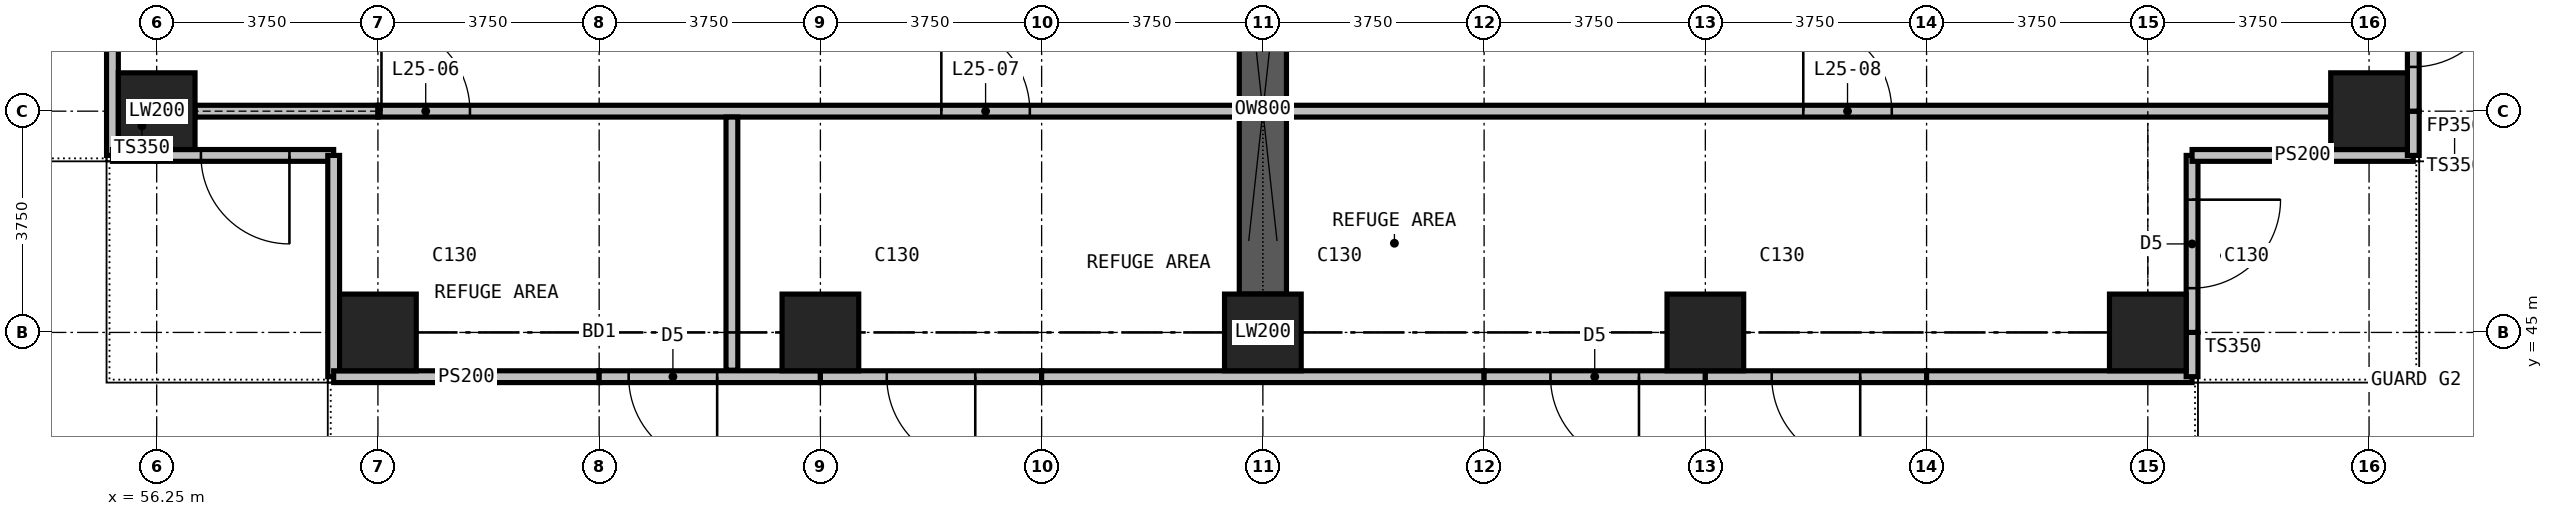
"""IFC4 building model, lengths in metres.
Left out: names, types, materials, properties, quantities, classifications, styles, units other than length and angle.
Written with IfcOpenShell. Run it as: python <this file> out.ifc"""

import sys

from ifc_helpers import new_model, si_unit, direction, frame, frame_2d, origin, origin_2d, place, context, subcontext, project, spatial, rectangle, extrude, element, fill, save


model = new_model("IFC4")
c1 = context("Model", 3, precision=1e-05, world=origin(), true_north=direction((0.0, 1.0)))
c2 = subcontext(c1, "Body", "Model", "MODEL_VIEW")
j1 = project(units=[si_unit("LENGTHUNIT", "METRE"), si_unit("PLANEANGLEUNIT", "RADIAN")], contexts=[c1])
p1 = place(None, origin())
s1 = spatial("IfcSite", under=j1, at=p1, CompositionType="ELEMENT")
p2 = place(p1, origin())
s2 = spatial("IfcBuilding", under=s1, at=p2, CompositionType="ELEMENT")
p3 = place(p2, frame((0.0, 0.0, 102.2)))
s3 = spatial("IfcBuildingStorey", under=s2, at=p3, CompositionType="ELEMENT", Elevation=102.2)
for number, where, z_axis, x_axis in (
    (1, (56.25, 48.75, 0.0), (0.0, 0.0, 1.0), (1.0, 0.0, 0.0)),
    (2, (60.0, 45.0, 0.0), (0.0, 0.0, 1.0), (1.0, 0.0, 0.0)),
    (3, (67.5, 45.0, 0.0), (0.0, 0.0, 1.0), (1.0, 0.0, 0.0)),
    (4, (75.0, 45.0, 0.0), (0.0, 0.0, 1.0), (1.0, 0.0, 0.0)),
    (5, (82.5, 45.0, 0.0), (0.0, 0.0, 1.0), (1.0, 0.0, 0.0)),
    (6, (90.0, 45.0, 0.0), (0.0, 0.0, 1.0), (1.0, 0.0, 0.0)),
    (7, (93.75, 48.75, 0.0), (0.0, 0.0, 1.0), (1.0, 0.0, 0.0)),
):
    element("IfcColumn", number, at=place(p3, frame(where, z_axis=z_axis, x_axis=x_axis)), inside=s3, PredefinedType="COLUMN", context=c2, shape_type="SweptSolid", body=[
        extrude(rectangle(XDim=1.3, YDim=1.3, at=origin_2d()), origin(), (0.0, 0.0, 1.0), 5.0),
    ])
p4 = place(p3, frame((75.0, 45.65, 0.0), z_axis=(0.0, 0.0, 1.0), x_axis=(0.0, 1.0, 0.0)))
e8 = element("IfcWall", 8, at=p4, inside=s3, PredefinedType="SHEAR", context=c2, shape_type="SweptSolid", body=[
    extrude(rectangle(XDim=6.275, YDim=0.8, at=frame_2d((3.138, 0.0))), origin(), (0.0, 0.0, 1.0), 4.7),
])
p5 = place(p3, frame((55.5, 48.0, 0.0), z_axis=(0.0, 0.0, 1.0), x_axis=(0.0, 1.0, 0.0)))
e9 = element("IfcWall", 9, at=p5, inside=s3, PredefinedType="SOLIDWALL", context=c2, shape_type="SweptSolid", body=[
    extrude(rectangle(XDim=3.75, YDim=0.2, at=frame_2d((1.875, 0.0))), origin(), (0.0, 0.0, 1.0), 4.7),
])
p6 = place(p3, frame((55.5, 48.0, 0.0), z_axis=(0.0, 0.0, 1.0), x_axis=(1.0, 0.0, 0.0)))
e10 = element("IfcWall", 10, at=p6, inside=s3, PredefinedType="SOLIDWALL", context=c2, shape_type="SweptSolid", body=[
    extrude(rectangle(XDim=0.75, YDim=0.2, at=frame_2d((0.375, 0.0))), origin(), (0.0, 0.0, 1.0), 4.7),
])
p7 = place(p3, frame((59.25, 48.0, 0.0), z_axis=(0.0, 0.0, 1.0), x_axis=(-1.0, 0.0, 0.0)))
e11 = element("IfcWall", 11, at=p7, inside=s3, PredefinedType="SOLIDWALL", context=c2, shape_type="SweptSolid", body=[
    extrude(rectangle(XDim=3.0, YDim=0.2, at=frame_2d((1.5, 0.0))), origin(), (0.0, 0.0, 1.0), 4.7),
])
p8 = place(p7, frame((0.75, 0.0, 0.0)))
e12 = element("IfcOpeningElement", 12, at=p8, cuts=e11, PredefinedType="OPENING", context=c2, shape_type="SweptSolid", body=[
    extrude(rectangle(XDim=1.5, YDim=2.4, at=frame_2d((0.75, 1.2))), frame((0.0, 0.11, 0.0), z_axis=(0.0, -1.0, 0.0), x_axis=(1.0, 0.0, 0.0)), (0.0, 0.0, 1.0), 0.22),
])
p9 = place(p3, frame((59.25, 44.25, 0.0), z_axis=(0.0, 0.0, 1.0), x_axis=(0.0, 1.0, 0.0)))
e13 = element("IfcWall", 13, at=p9, inside=s3, PredefinedType="SOLIDWALL", context=c2, shape_type="SweptSolid", body=[
    extrude(rectangle(XDim=3.75, YDim=0.2, at=frame_2d((1.875, 0.0))), origin(), (0.0, 0.0, 1.0), 4.7),
])
p10 = place(p3, frame((59.25, 44.25, 0.0), z_axis=(0.0, 0.0, 1.0), x_axis=(1.0, 0.0, 0.0)))
e14 = element("IfcWall", 14, at=p10, inside=s3, PredefinedType="SOLIDWALL", context=c2, shape_type="SweptSolid", body=[
    extrude(rectangle(XDim=4.5, YDim=0.2, at=frame_2d((2.25, 0.0))), origin(), (0.0, 0.0, 1.0), 4.7),
])
p11 = place(p3, frame((67.5, 44.25, 0.0), z_axis=(0.0, 0.0, 1.0), x_axis=(-1.0, 0.0, 0.0)))
e15 = element("IfcWall", 15, at=p11, inside=s3, PredefinedType="SOLIDWALL", context=c2, shape_type="SweptSolid", body=[
    extrude(rectangle(XDim=3.75, YDim=0.2, at=frame_2d((1.875, 0.0))), origin(), (0.0, 0.0, 1.0), 4.7),
])
p12 = place(p11, frame((1.75, 0.0, 0.0)))
e16 = element("IfcOpeningElement", 16, at=p12, cuts=e15, PredefinedType="OPENING", context=c2, shape_type="SweptSolid", body=[
    extrude(rectangle(XDim=1.5, YDim=2.4, at=frame_2d((0.75, 1.2))), frame((0.0, 0.11, 0.0), z_axis=(0.0, -1.0, 0.0), x_axis=(1.0, 0.0, 0.0)), (0.0, 0.0, 1.0), 0.22),
])
p13 = place(p3, frame((71.25, 44.25, 0.0), z_axis=(0.0, 0.0, 1.0), x_axis=(-1.0, 0.0, 0.0)))
e17 = element("IfcWall", 17, at=p13, inside=s3, PredefinedType="SOLIDWALL", context=c2, shape_type="SweptSolid", body=[
    extrude(rectangle(XDim=3.75, YDim=0.2, at=frame_2d((1.875, 0.0))), origin(), (0.0, 0.0, 1.0), 4.7),
])
p14 = place(p13, frame((1.125, 0.0, 0.0)))
e18 = element("IfcOpeningElement", 18, at=p14, cuts=e17, PredefinedType="OPENING", context=c2, shape_type="SweptSolid", body=[
    extrude(rectangle(XDim=1.5, YDim=2.4, at=frame_2d((0.75, 1.2))), frame((0.0, 0.11, 0.0), z_axis=(0.0, -1.0, 0.0), x_axis=(1.0, 0.0, 0.0)), (0.0, 0.0, 1.0), 0.22),
])
p15 = place(p3, frame((71.25, 44.25, 0.0), z_axis=(0.0, 0.0, 1.0), x_axis=(1.0, 0.0, 0.0)))
e19 = element("IfcWall", 19, at=p15, inside=s3, PredefinedType="SOLIDWALL", context=c2, shape_type="SweptSolid", body=[
    extrude(rectangle(XDim=7.5, YDim=0.2, at=frame_2d((3.75, 0.0))), origin(), (0.0, 0.0, 1.0), 4.7),
])
p16 = place(p3, frame((82.5, 44.25, 0.0), z_axis=(0.0, 0.0, 1.0), x_axis=(-1.0, 0.0, 0.0)))
e20 = element("IfcWall", 20, at=p16, inside=s3, PredefinedType="SOLIDWALL", context=c2, shape_type="SweptSolid", body=[
    extrude(rectangle(XDim=3.75, YDim=0.2, at=frame_2d((1.875, 0.0))), origin(), (0.0, 0.0, 1.0), 4.7),
])
p17 = place(p16, frame((1.125, 0.0, 0.0)))
e21 = element("IfcOpeningElement", 21, at=p17, cuts=e20, PredefinedType="OPENING", context=c2, shape_type="SweptSolid", body=[
    extrude(rectangle(XDim=1.5, YDim=2.4, at=frame_2d((0.75, 1.2))), frame((0.0, 0.11, 0.0), z_axis=(0.0, -1.0, 0.0), x_axis=(1.0, 0.0, 0.0)), (0.0, 0.0, 1.0), 0.22),
])
p18 = place(p3, frame((86.25, 44.25, 0.0), z_axis=(0.0, 0.0, 1.0), x_axis=(-1.0, 0.0, 0.0)))
e22 = element("IfcWall", 22, at=p18, inside=s3, PredefinedType="SOLIDWALL", context=c2, shape_type="SweptSolid", body=[
    extrude(rectangle(XDim=3.75, YDim=0.2, at=frame_2d((1.875, 0.0))), origin(), (0.0, 0.0, 1.0), 4.7),
])
p19 = place(p18, frame((1.125, 0.0, 0.0)))
e23 = element("IfcOpeningElement", 23, at=p19, cuts=e22, PredefinedType="OPENING", context=c2, shape_type="SweptSolid", body=[
    extrude(rectangle(XDim=1.5, YDim=2.4, at=frame_2d((0.75, 1.2))), frame((0.0, 0.11, 0.0), z_axis=(0.0, -1.0, 0.0), x_axis=(1.0, 0.0, 0.0)), (0.0, 0.0, 1.0), 0.22),
])
p20 = place(p3, frame((86.25, 44.25, 0.0), z_axis=(0.0, 0.0, 1.0), x_axis=(1.0, 0.0, 0.0)))
e24 = element("IfcWall", 24, at=p20, inside=s3, PredefinedType="SOLIDWALL", context=c2, shape_type="SweptSolid", body=[
    extrude(rectangle(XDim=4.5, YDim=0.2, at=frame_2d((2.25, 0.0))), origin(), (0.0, 0.0, 1.0), 4.7),
])
p21 = place(p3, frame((90.75, 44.25, 0.0), z_axis=(0.0, 0.0, 1.0), x_axis=(0.0, 1.0, 0.0)))
e25 = element("IfcWall", 25, at=p21, inside=s3, PredefinedType="SOLIDWALL", context=c2, shape_type="SweptSolid", body=[
    extrude(rectangle(XDim=0.75, YDim=0.2, at=frame_2d((0.375, 0.0))), origin(), (0.0, 0.0, 1.0), 4.7),
])
p22 = place(p3, frame((90.75, 48.0, 0.0), z_axis=(0.0, 0.0, 1.0), x_axis=(0.0, -1.0, 0.0)))
e26 = element("IfcWall", 26, at=p22, inside=s3, PredefinedType="SOLIDWALL", context=c2, shape_type="SweptSolid", body=[
    extrude(rectangle(XDim=3.0, YDim=0.2, at=frame_2d((1.5, 0.0))), origin(), (0.0, 0.0, 1.0), 4.7),
])
p23 = place(p22, frame((0.75, 0.0, 0.0)))
e27 = element("IfcOpeningElement", 27, at=p23, cuts=e26, PredefinedType="OPENING", context=c2, shape_type="SweptSolid", body=[
    extrude(rectangle(XDim=1.5, YDim=2.4, at=frame_2d((0.75, 1.2))), frame((0.0, 0.11, 0.0), z_axis=(0.0, -1.0, 0.0), x_axis=(1.0, 0.0, 0.0)), (0.0, 0.0, 1.0), 0.22),
])
p24 = place(p3, frame((90.75, 48.0, 0.0), z_axis=(0.0, 0.0, 1.0), x_axis=(1.0, 0.0, 0.0)))
e28 = element("IfcWall", 28, at=p24, inside=s3, PredefinedType="SOLIDWALL", context=c2, shape_type="SweptSolid", body=[
    extrude(rectangle(XDim=3.75, YDim=0.2, at=frame_2d((1.875, 0.0))), origin(), (0.0, 0.0, 1.0), 4.7),
])
p25 = place(p3, frame((94.5, 48.0, 0.0), z_axis=(0.0, 0.0, 1.0), x_axis=(0.0, 1.0, 0.0)))
e29 = element("IfcWall", 29, at=p25, inside=s3, PredefinedType="SOLIDWALL", context=c2, shape_type="SweptSolid", body=[
    extrude(rectangle(XDim=0.75, YDim=0.2, at=frame_2d((0.375, 0.0))), origin(), (0.0, 0.0, 1.0), 4.7),
])
p26 = place(p3, frame((94.5, 51.75, 0.0), z_axis=(0.0, 0.0, 1.0), x_axis=(0.0, -1.0, 0.0)))
e30 = element("IfcWall", 30, at=p26, inside=s3, PredefinedType="SOLIDWALL", context=c2, shape_type="SweptSolid", body=[
    extrude(rectangle(XDim=3.0, YDim=0.2, at=frame_2d((1.5, 0.0))), origin(), (0.0, 0.0, 1.0), 4.7),
])
p27 = place(p26, frame((0.75, 0.0, 0.0)))
e31 = element("IfcOpeningElement", 31, at=p27, cuts=e30, PredefinedType="OPENING", context=c2, shape_type="SweptSolid", body=[
    extrude(rectangle(XDim=1.5, YDim=2.4, at=frame_2d((0.75, 1.2))), frame((0.0, 0.11, 0.0), z_axis=(0.0, -1.0, 0.0), x_axis=(1.0, 0.0, 0.0)), (0.0, 0.0, 1.0), 0.22),
])
p28 = place(p3, frame((55.61, 48.75, 0.0), z_axis=(0.0, 0.0, 1.0), x_axis=(1.0, 0.0, 0.0)))
e32 = element("IfcWall", 32, at=p28, inside=s3, PredefinedType="PARTITIONING", context=c2, shape_type="SweptSolid", body=[
    extrude(rectangle(XDim=1.289, YDim=0.2, at=frame_2d((0.645, 0.0))), origin(), (0.0, 0.0, 1.0), 4.7),
])
p29 = place(p3, frame((56.899, 48.75, 0.0), z_axis=(0.0, 0.0, 1.0), x_axis=(1.0, 0.0, 0.0)))
e33 = element("IfcWall", 33, at=p29, inside=s3, PredefinedType="PARTITIONING", context=c2, shape_type="SweptSolid", body=[
    extrude(rectangle(XDim=3.102, YDim=0.2, at=frame_2d((1.551, 0.0))), origin(), (0.0, 0.0, 1.0), 3.3),
])
p30 = place(p3, frame((60.001, 48.75, 0.0), z_axis=(0.0, 0.0, 1.0), x_axis=(1.0, 0.0, 0.0)))
e34 = element("IfcWall", 34, at=p30, inside=s3, PredefinedType="PARTITIONING", context=c2, shape_type="SweptSolid", body=[
    extrude(rectangle(XDim=14.589, YDim=0.2, at=frame_2d((7.294, 0.0))), origin(), (0.0, 0.0, 1.0), 4.7),
])
p31 = place(p30, frame((0.059, 0.0, 0.0)))
e35 = element("IfcOpeningElement", 35, at=p31, cuts=e34, PredefinedType="OPENING", context=c2, shape_type="SweptSolid", body=[
    extrude(rectangle(XDim=1.5, YDim=2.2, at=frame_2d((0.75, 1.1))), frame((0.0, 0.11, 0.0), z_axis=(0.0, -1.0, 0.0), x_axis=(1.0, 0.0, 0.0)), (0.0, 0.0, 1.0), 0.22),
])
p32 = place(p30, frame((9.549, 0.0, 0.0)))
e36 = element("IfcOpeningElement", 36, at=p32, cuts=e34, PredefinedType="OPENING", context=c2, shape_type="SweptSolid", body=[
    extrude(rectangle(XDim=1.5, YDim=2.2, at=frame_2d((0.75, 1.1))), frame((0.0, 0.11, 0.0), z_axis=(0.0, -1.0, 0.0), x_axis=(1.0, 0.0, 0.0)), (0.0, 0.0, 1.0), 0.22),
])
p33 = place(p3, frame((75.41, 48.75, 0.0), z_axis=(0.0, 0.0, 1.0), x_axis=(1.0, 0.0, 0.0)))
e37 = element("IfcWall", 37, at=p33, inside=s3, PredefinedType="PARTITIONING", context=c2, shape_type="SweptSolid", body=[
    extrude(rectangle(XDim=18.98, YDim=0.2, at=frame_2d((9.49, 0.0))), origin(), (0.0, 0.0, 1.0), 4.7),
])
p34 = place(p33, frame((8.75, 0.0, 0.0)))
e38 = element("IfcOpeningElement", 38, at=p34, cuts=e37, PredefinedType="OPENING", context=c2, shape_type="SweptSolid", body=[
    extrude(rectangle(XDim=1.5, YDim=2.2, at=frame_2d((0.75, 1.1))), frame((0.0, 0.11, 0.0), z_axis=(0.0, -1.0, 0.0), x_axis=(1.0, 0.0, 0.0)), (0.0, 0.0, 1.0), 0.22),
])
p35 = place(p3, frame((66.0, 44.36, 0.0), z_axis=(0.0, 0.0, 1.0), x_axis=(0.0, 1.0, 0.0)))
e39 = element("IfcWall", 39, at=p35, inside=s3, PredefinedType="PARTITIONING", context=c2, shape_type="SweptSolid", body=[
    extrude(rectangle(XDim=4.29, YDim=0.2, at=frame_2d((2.145, 0.0))), origin(), (0.0, 0.0, 1.0), 4.7),
])
p36 = place(p3, frame((75.0, 44.36, 0.0), z_axis=(0.0, 0.0, 1.0), x_axis=(0.0, 1.0, 0.0)))
e40 = element("IfcWall", 40, at=p36, inside=s3, PredefinedType="PARTITIONING", context=c2, shape_type="SweptSolid", body=[
    extrude(rectangle(XDim=1.28, YDim=0.2, at=frame_2d((0.64, 0.0))), origin(), (0.0, 0.0, 1.0), 4.7),
])
p37 = place(p8, origin())
e41 = element("IfcDoor", 41, at=p37, inside=s3, OperationType="DOUBLE_DOOR_SINGLE_SWING", PredefinedType="DOOR", context=c2, shape_type="SweptSolid", body=[
    extrude(rectangle(XDim=1.5, YDim=2.4, at=frame_2d((0.75, 1.2))), frame((0.0, 0.025, 0.0), z_axis=(0.0, -1.0, 0.0), x_axis=(1.0, 0.0, 0.0)), (0.0, 0.0, 1.0), 0.05),
])
fill(e12, e41)
p38 = place(p12, origin())
e42 = element("IfcDoor", 42, at=p38, inside=s3, OperationType="DOUBLE_DOOR_SINGLE_SWING", PredefinedType="DOOR", context=c2, shape_type="SweptSolid", body=[
    extrude(rectangle(XDim=1.5, YDim=2.4, at=frame_2d((0.75, 1.2))), frame((0.0, 0.025, 0.0), z_axis=(0.0, -1.0, 0.0), x_axis=(1.0, 0.0, 0.0)), (0.0, 0.0, 1.0), 0.05),
])
fill(e16, e42)
p39 = place(p14, origin())
e43 = element("IfcDoor", 43, at=p39, inside=s3, OperationType="DOUBLE_DOOR_SINGLE_SWING", PredefinedType="DOOR", context=c2, shape_type="SweptSolid", body=[
    extrude(rectangle(XDim=1.5, YDim=2.4, at=frame_2d((0.75, 1.2))), frame((0.0, 0.025, 0.0), z_axis=(0.0, -1.0, 0.0), x_axis=(1.0, 0.0, 0.0)), (0.0, 0.0, 1.0), 0.05),
])
fill(e18, e43)
p40 = place(p17, origin())
e44 = element("IfcDoor", 44, at=p40, inside=s3, OperationType="DOUBLE_DOOR_SINGLE_SWING", PredefinedType="DOOR", context=c2, shape_type="SweptSolid", body=[
    extrude(rectangle(XDim=1.5, YDim=2.4, at=frame_2d((0.75, 1.2))), frame((0.0, 0.025, 0.0), z_axis=(0.0, -1.0, 0.0), x_axis=(1.0, 0.0, 0.0)), (0.0, 0.0, 1.0), 0.05),
])
fill(e21, e44)
p41 = place(p19, origin())
e45 = element("IfcDoor", 45, at=p41, inside=s3, OperationType="DOUBLE_DOOR_SINGLE_SWING", PredefinedType="DOOR", context=c2, shape_type="SweptSolid", body=[
    extrude(rectangle(XDim=1.5, YDim=2.4, at=frame_2d((0.75, 1.2))), frame((0.0, 0.025, 0.0), z_axis=(0.0, -1.0, 0.0), x_axis=(1.0, 0.0, 0.0)), (0.0, 0.0, 1.0), 0.05),
])
fill(e23, e45)
p42 = place(p23, origin())
e46 = element("IfcDoor", 46, at=p42, inside=s3, OperationType="DOUBLE_DOOR_SINGLE_SWING", PredefinedType="DOOR", context=c2, shape_type="SweptSolid", body=[
    extrude(rectangle(XDim=1.5, YDim=2.4, at=frame_2d((0.75, 1.2))), frame((0.0, 0.025, 0.0), z_axis=(0.0, -1.0, 0.0), x_axis=(1.0, 0.0, 0.0)), (0.0, 0.0, 1.0), 0.05),
])
fill(e27, e46)
p43 = place(p27, origin())
e47 = element("IfcDoor", 47, at=p43, inside=s3, OperationType="DOUBLE_DOOR_SINGLE_SWING", PredefinedType="DOOR", context=c2, shape_type="SweptSolid", body=[
    extrude(rectangle(XDim=1.5, YDim=2.4, at=frame_2d((0.75, 1.2))), frame((0.0, 0.025, 0.0), z_axis=(0.0, -1.0, 0.0), x_axis=(1.0, 0.0, 0.0)), (0.0, 0.0, 1.0), 0.05),
])
fill(e31, e47)
p44 = place(p31, origin())
e48 = element("IfcDoor", 48, at=p44, inside=s3, OperationType="DOUBLE_DOOR_SINGLE_SWING", PredefinedType="DOOR", context=c2, shape_type="SweptSolid", body=[
    extrude(rectangle(XDim=1.5, YDim=2.2, at=frame_2d((0.75, 1.1))), frame((0.0, 0.025, 0.0), z_axis=(0.0, -1.0, 0.0), x_axis=(1.0, 0.0, 0.0)), (0.0, 0.0, 1.0), 0.05),
])
fill(e35, e48)
p45 = place(p32, origin())
e49 = element("IfcDoor", 49, at=p45, inside=s3, OperationType="DOUBLE_DOOR_SINGLE_SWING", PredefinedType="DOOR", context=c2, shape_type="SweptSolid", body=[
    extrude(rectangle(XDim=1.5, YDim=2.2, at=frame_2d((0.75, 1.1))), frame((0.0, 0.025, 0.0), z_axis=(0.0, -1.0, 0.0), x_axis=(1.0, 0.0, 0.0)), (0.0, 0.0, 1.0), 0.05),
])
fill(e36, e49)
p46 = place(p34, origin())
e50 = element("IfcDoor", 50, at=p46, inside=s3, OperationType="DOUBLE_DOOR_SINGLE_SWING", PredefinedType="DOOR", context=c2, shape_type="SweptSolid", body=[
    extrude(rectangle(XDim=1.5, YDim=2.2, at=frame_2d((0.75, 1.1))), frame((0.0, 0.025, 0.0), z_axis=(0.0, -1.0, 0.0), x_axis=(1.0, 0.0, 0.0)), (0.0, 0.0, 1.0), 0.05),
])
fill(e38, e50)
save(model, sys.argv[1])
